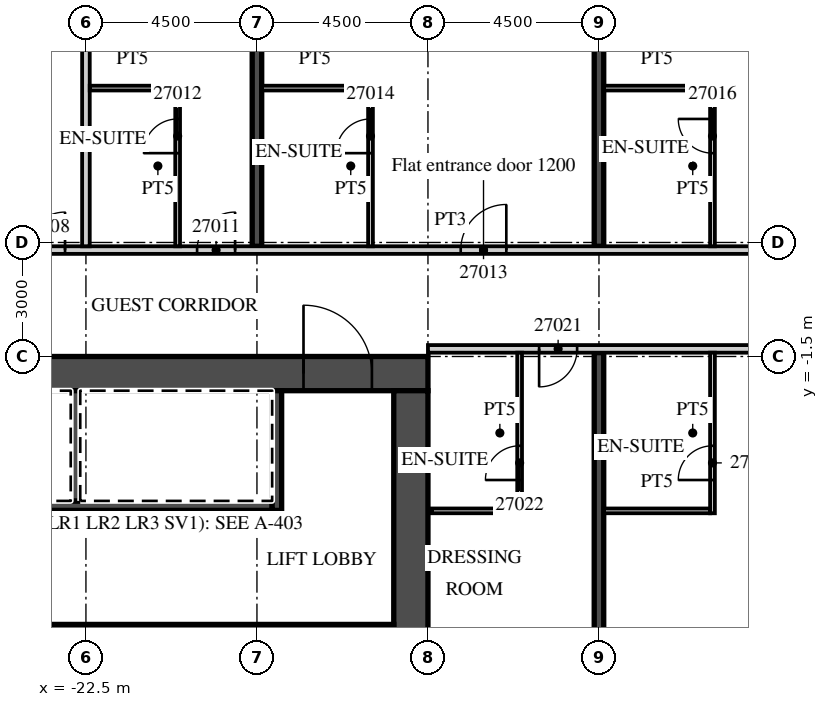
"""IFC4 building model, lengths in metres.
Left out: names, types, materials, properties, quantities, classifications, styles, units other than length and angle.
Written with IfcOpenShell. Run it as: python <this file> out.ifc"""

import sys

from ifc_helpers import new_model, si_unit, direction, frame, frame_2d, origin, place, context, subcontext, project, spatial, rectangle, extrude, element, fill, save


model = new_model("IFC4")
c1 = context("Model", 3, precision=1e-05, world=origin(), true_north=direction((0.0, 1.0)))
c2 = subcontext(c1, "Body", "Model", "MODEL_VIEW")
j1 = project(units=[si_unit("LENGTHUNIT", "METRE"), si_unit("PLANEANGLEUNIT", "RADIAN")], contexts=[c1])
p1 = place(None, origin())
s1 = spatial("IfcSite", under=j1, at=p1, CompositionType="ELEMENT")
p2 = place(p1, origin())
s2 = spatial("IfcBuilding", under=s1, at=p2, CompositionType="ELEMENT")
p3 = place(p2, frame((0.0, 0.0, 124.0)))
s3 = spatial("IfcBuildingStorey", under=s2, at=p3, CompositionType="ELEMENT", Elevation=124.0)
p4 = place(p3, frame((-18.0, 1.4, 0.0), z_axis=(0.0, 0.0, 1.0), x_axis=(0.0, 1.0, 0.0)))
e1 = element("IfcWall", 1, at=p4, inside=s3, PredefinedType="SHEAR", context=c2, shape_type="SweptSolid", body=[
    extrude(rectangle(XDim=18.207, YDim=0.25, at=frame_2d((9.104, 0.0))), origin(), (0.0, 0.0, 1.0), 3.3),
])
p5 = place(p3, frame((-9.0, -21.777, 0.0), z_axis=(0.0, 0.0, 1.0), x_axis=(0.0, 1.0, 0.0)))
e2 = element("IfcWall", 2, at=p5, inside=s3, PredefinedType="SHEAR", context=c2, shape_type="SweptSolid", body=[
    extrude(rectangle(XDim=20.377, YDim=0.25, at=frame_2d((10.188, 0.0))), origin(), (0.0, 0.0, 1.0), 3.3),
])
p6 = place(p3, frame((-9.0, 1.4, 0.0), z_axis=(0.0, 0.0, 1.0), x_axis=(0.0, 1.0, 0.0)))
e3 = element("IfcWall", 3, at=p6, inside=s3, PredefinedType="SHEAR", context=c2, shape_type="SweptSolid", body=[
    extrude(rectangle(XDim=19.073, YDim=0.25, at=frame_2d((9.537, 0.0))), origin(), (0.0, 0.0, 1.0), 3.3),
])
p7 = place(p3, frame((-39.316, 1.3, 0.0), z_axis=(0.0, 0.0, 1.0), x_axis=(1.0, 0.0, 0.0)))
e4 = element("IfcWall", 4, at=p7, inside=s3, PredefinedType="PARTITIONING", context=c2, shape_type="SweptSolid", body=[
    extrude(rectangle(XDim=52.816, YDim=0.2, at=frame_2d((26.408, 0.0))), origin(), (0.0, 0.0, 1.0), 3.02),
])
p8 = place(p7, frame((0.15, 0.0, 0.0)))
e5 = element("IfcOpeningElement", 5, at=p8, cuts=e4, PredefinedType="OPENING", context=c2, shape_type="SweptSolid", body=[
    extrude(rectangle(XDim=0.9, YDim=2.1, at=frame_2d((0.45, 1.05))), frame((0.0, 0.11, 0.0), z_axis=(0.0, -1.0, 0.0), x_axis=(1.0, 0.0, 0.0)), (0.0, 0.0, 1.0), 0.22),
])
p9 = place(p7, frame((3.891, 0.0, 0.0)))
e6 = element("IfcOpeningElement", 6, at=p9, cuts=e4, PredefinedType="OPENING", context=c2, shape_type="SweptSolid", body=[
    extrude(rectangle(XDim=1.0, YDim=2.1, at=frame_2d((0.5, 1.05))), frame((0.0, 0.11, 0.0), z_axis=(0.0, -1.0, 0.0), x_axis=(1.0, 0.0, 0.0)), (0.0, 0.0, 1.0), 0.22),
])
p10 = place(p7, frame((10.741, 0.0, 0.0)))
e7 = element("IfcOpeningElement", 7, at=p10, cuts=e4, PredefinedType="OPENING", context=c2, shape_type="SweptSolid", body=[
    extrude(rectangle(XDim=1.0, YDim=2.1, at=frame_2d((0.5, 1.05))), frame((0.0, 0.11, 0.0), z_axis=(0.0, -1.0, 0.0), x_axis=(1.0, 0.0, 0.0)), (0.0, 0.0, 1.0), 0.22),
])
p11 = place(p7, frame((15.266, 0.0, 0.0)))
e8 = element("IfcOpeningElement", 8, at=p11, cuts=e4, PredefinedType="OPENING", context=c2, shape_type="SweptSolid", body=[
    extrude(rectangle(XDim=1.0, YDim=2.1, at=frame_2d((0.5, 1.05))), frame((0.0, 0.11, 0.0), z_axis=(0.0, -1.0, 0.0), x_axis=(1.0, 0.0, 0.0)), (0.0, 0.0, 1.0), 0.22),
])
p12 = place(p7, frame((19.741, 0.0, 0.0)))
e9 = element("IfcOpeningElement", 9, at=p12, cuts=e4, PredefinedType="OPENING", context=c2, shape_type="SweptSolid", body=[
    extrude(rectangle(XDim=1.0, YDim=2.1, at=frame_2d((0.5, 1.05))), frame((0.0, 0.11, 0.0), z_axis=(0.0, -1.0, 0.0), x_axis=(1.0, 0.0, 0.0)), (0.0, 0.0, 1.0), 0.22),
])
p13 = place(p7, frame((26.678, 0.0, 0.0)))
e10 = element("IfcOpeningElement", 10, at=p13, cuts=e4, PredefinedType="OPENING", context=c2, shape_type="SweptSolid", body=[
    extrude(rectangle(XDim=1.2, YDim=2.1, at=frame_2d((0.6, 1.05))), frame((0.0, 0.11, 0.0), z_axis=(0.0, -1.0, 0.0), x_axis=(1.0, 0.0, 0.0)), (0.0, 0.0, 1.0), 0.22),
])
p14 = place(p7, frame((35.678, 0.0, 0.0)))
e11 = element("IfcOpeningElement", 11, at=p14, cuts=e4, PredefinedType="OPENING", context=c2, shape_type="SweptSolid", body=[
    extrude(rectangle(XDim=1.2, YDim=2.1, at=frame_2d((0.6, 1.05))), frame((0.0, 0.11, 0.0), z_axis=(0.0, -1.0, 0.0), x_axis=(1.0, 0.0, 0.0)), (0.0, 0.0, 1.0), 0.22),
])
p15 = place(p7, frame((41.754, 0.0, 0.0)))
e12 = element("IfcOpeningElement", 12, at=p15, cuts=e4, PredefinedType="OPENING", context=c2, shape_type="SweptSolid", body=[
    extrude(rectangle(XDim=1.2, YDim=2.1, at=frame_2d((0.6, 1.05))), frame((0.0, 0.11, 0.0), z_axis=(0.0, -1.0, 0.0), x_axis=(1.0, 0.0, 0.0)), (0.0, 0.0, 1.0), 0.22),
])
p16 = place(p7, frame((51.241, 0.0, 0.0)))
e13 = element("IfcOpeningElement", 13, at=p16, cuts=e4, PredefinedType="OPENING", context=c2, shape_type="SweptSolid", body=[
    extrude(rectangle(XDim=1.0, YDim=2.1, at=frame_2d((0.5, 1.05))), frame((0.0, 0.11, 0.0), z_axis=(0.0, -1.0, 0.0), x_axis=(1.0, 0.0, 0.0)), (0.0, 0.0, 1.0), 0.22),
])
p17 = place(p3, frame((-22.5, 1.4, 0.0), z_axis=(0.0, 0.0, 1.0), x_axis=(0.0, 1.0, 0.0)))
e14 = element("IfcWall", 14, at=p17, inside=s3, PredefinedType="PARTITIONING", context=c2, shape_type="SweptSolid", body=[
    extrude(rectangle(XDim=17.796, YDim=0.2, at=frame_2d((8.898, 0.0))), origin(), (0.0, 0.0, 1.0), 3.02),
])
p18 = place(p3, frame((-20.087, 1.4, 0.0), z_axis=(0.0, 0.0, 1.0), x_axis=(0.0, 1.0, 0.0)))
e15 = element("IfcWall", 15, at=p18, inside=s3, PredefinedType="PARTITIONING", context=c2, shape_type="SweptSolid", body=[
    extrude(rectangle(XDim=4.225, YDim=0.125, at=frame_2d((2.113, 0.0))), origin(), (0.0, 0.0, 1.0), 3.02),
])
p19 = place(p18, frame((2.45, 0.0, 0.0)))
e16 = element("IfcOpeningElement", 16, at=p19, cuts=e15, PredefinedType="OPENING", context=c2, shape_type="SweptSolid", body=[
    extrude(rectangle(XDim=0.9, YDim=2.1, at=frame_2d((0.45, 1.05))), frame((0.0, 0.073, 0.0), z_axis=(0.0, -1.0, 0.0), x_axis=(1.0, 0.0, 0.0)), (0.0, 0.0, 1.0), 0.145),
])
p20 = place(p3, frame((-22.4, 5.562, 0.0), z_axis=(0.0, 0.0, 1.0), x_axis=(1.0, 0.0, 0.0)))
e17 = element("IfcWall", 17, at=p20, inside=s3, PredefinedType="PARTITIONING", context=c2, shape_type="SweptSolid", body=[
    extrude(rectangle(XDim=2.25, YDim=0.125, at=frame_2d((1.125, 0.0))), origin(), (0.0, 0.0, 1.0), 3.02),
])
p21 = place(p3, frame((-15.012, 1.4, 0.0), z_axis=(0.0, 0.0, 1.0), x_axis=(0.0, 1.0, 0.0)))
e18 = element("IfcWall", 18, at=p21, inside=s3, PredefinedType="PARTITIONING", context=c2, shape_type="SweptSolid", body=[
    extrude(rectangle(XDim=4.225, YDim=0.125, at=frame_2d((2.113, 0.0))), origin(), (0.0, 0.0, 1.0), 3.02),
])
p22 = place(p21, frame((2.45, 0.0, 0.0)))
e19 = element("IfcOpeningElement", 19, at=p22, cuts=e18, PredefinedType="OPENING", context=c2, shape_type="SweptSolid", body=[
    extrude(rectangle(XDim=0.9, YDim=2.1, at=frame_2d((0.45, 1.05))), frame((0.0, 0.073, 0.0), z_axis=(0.0, -1.0, 0.0), x_axis=(1.0, 0.0, 0.0)), (0.0, 0.0, 1.0), 0.145),
])
p23 = place(p3, frame((-17.875, 5.562, 0.0), z_axis=(0.0, 0.0, 1.0), x_axis=(1.0, 0.0, 0.0)))
e20 = element("IfcWall", 20, at=p23, inside=s3, PredefinedType="PARTITIONING", context=c2, shape_type="SweptSolid", body=[
    extrude(rectangle(XDim=2.8, YDim=0.125, at=frame_2d((1.4, 0.0))), origin(), (0.0, 0.0, 1.0), 3.02),
])
p24 = place(p3, frame((-6.013, 1.4, 0.0), z_axis=(0.0, 0.0, 1.0), x_axis=(0.0, 1.0, 0.0)))
e21 = element("IfcWall", 21, at=p24, inside=s3, PredefinedType="PARTITIONING", context=c2, shape_type="SweptSolid", body=[
    extrude(rectangle(XDim=4.225, YDim=0.125, at=frame_2d((2.113, 0.0))), origin(), (0.0, 0.0, 1.0), 3.02),
])
p25 = place(p24, frame((2.45, 0.0, 0.0)))
e22 = element("IfcOpeningElement", 22, at=p25, cuts=e21, PredefinedType="OPENING", context=c2, shape_type="SweptSolid", body=[
    extrude(rectangle(XDim=0.9, YDim=2.1, at=frame_2d((0.45, 1.05))), frame((0.0, 0.073, 0.0), z_axis=(0.0, -1.0, 0.0), x_axis=(1.0, 0.0, 0.0)), (0.0, 0.0, 1.0), 0.145),
])
p26 = place(p3, frame((-8.875, 5.562, 0.0), z_axis=(0.0, 0.0, 1.0), x_axis=(1.0, 0.0, 0.0)))
e23 = element("IfcWall", 23, at=p26, inside=s3, PredefinedType="PARTITIONING", context=c2, shape_type="SweptSolid", body=[
    extrude(rectangle(XDim=2.8, YDim=0.125, at=frame_2d((1.4, 0.0))), origin(), (0.0, 0.0, 1.0), 3.02),
])
p27 = place(p3, frame((-13.5, -1.3, 0.0), z_axis=(0.0, 0.0, 1.0), x_axis=(1.0, 0.0, 0.0)))
e24 = element("IfcWall", 24, at=p27, inside=s3, PredefinedType="PARTITIONING", context=c2, shape_type="SweptSolid", body=[
    extrude(rectangle(XDim=60.932, YDim=0.2, at=frame_2d((30.466, 0.0))), origin(), (0.0, 0.0, 1.0), 3.02),
])
p28 = place(p27, frame((2.925, 0.0, 0.0)))
e25 = element("IfcOpeningElement", 25, at=p28, cuts=e24, PredefinedType="OPENING", context=c2, shape_type="SweptSolid", body=[
    extrude(rectangle(XDim=1.0, YDim=2.1, at=frame_2d((0.5, 1.05))), frame((0.0, 0.11, 0.0), z_axis=(0.0, -1.0, 0.0), x_axis=(1.0, 0.0, 0.0)), (0.0, 0.0, 1.0), 0.22),
])
p29 = place(p27, frame((9.863, 0.0, 0.0)))
e26 = element("IfcOpeningElement", 26, at=p29, cuts=e24, PredefinedType="OPENING", context=c2, shape_type="SweptSolid", body=[
    extrude(rectangle(XDim=1.2, YDim=2.1, at=frame_2d((0.6, 1.05))), frame((0.0, 0.11, 0.0), z_axis=(0.0, -1.0, 0.0), x_axis=(1.0, 0.0, 0.0)), (0.0, 0.0, 1.0), 0.22),
])
p30 = place(p27, frame((15.938, 0.0, 0.0)))
e27 = element("IfcOpeningElement", 27, at=p30, cuts=e24, PredefinedType="OPENING", context=c2, shape_type="SweptSolid", body=[
    extrude(rectangle(XDim=1.2, YDim=2.1, at=frame_2d((0.6, 1.05))), frame((0.0, 0.11, 0.0), z_axis=(0.0, -1.0, 0.0), x_axis=(1.0, 0.0, 0.0)), (0.0, 0.0, 1.0), 0.22),
])
p31 = place(p27, frame((27.862, 0.0, 0.0)))
e28 = element("IfcOpeningElement", 28, at=p31, cuts=e24, PredefinedType="OPENING", context=c2, shape_type="SweptSolid", body=[
    extrude(rectangle(XDim=1.2, YDim=2.1, at=frame_2d((0.6, 1.05))), frame((0.0, 0.11, 0.0), z_axis=(0.0, -1.0, 0.0), x_axis=(1.0, 0.0, 0.0)), (0.0, 0.0, 1.0), 0.22),
])
p32 = place(p27, frame((34.45, 0.0, 0.0)))
e29 = element("IfcOpeningElement", 29, at=p32, cuts=e24, PredefinedType="OPENING", context=c2, shape_type="SweptSolid", body=[
    extrude(rectangle(XDim=1.0, YDim=2.1, at=frame_2d((0.5, 1.05))), frame((0.0, 0.11, 0.0), z_axis=(0.0, -1.0, 0.0), x_axis=(1.0, 0.0, 0.0)), (0.0, 0.0, 1.0), 0.22),
])
p33 = place(p27, frame((36.55, 0.0, 0.0)))
e30 = element("IfcOpeningElement", 30, at=p33, cuts=e24, PredefinedType="OPENING", context=c2, shape_type="SweptSolid", body=[
    extrude(rectangle(XDim=1.0, YDim=2.1, at=frame_2d((0.5, 1.05))), frame((0.0, 0.11, 0.0), z_axis=(0.0, -1.0, 0.0), x_axis=(1.0, 0.0, 0.0)), (0.0, 0.0, 1.0), 0.22),
])
p34 = place(p27, frame((41.075, 0.0, 0.0)))
e31 = element("IfcOpeningElement", 31, at=p34, cuts=e24, PredefinedType="OPENING", context=c2, shape_type="SweptSolid", body=[
    extrude(rectangle(XDim=1.0, YDim=2.1, at=frame_2d((0.5, 1.05))), frame((0.0, 0.11, 0.0), z_axis=(0.0, -1.0, 0.0), x_axis=(1.0, 0.0, 0.0)), (0.0, 0.0, 1.0), 0.22),
])
p35 = place(p27, frame((45.55, 0.0, 0.0)))
e32 = element("IfcOpeningElement", 32, at=p35, cuts=e24, PredefinedType="OPENING", context=c2, shape_type="SweptSolid", body=[
    extrude(rectangle(XDim=1.0, YDim=2.1, at=frame_2d((0.5, 1.05))), frame((0.0, 0.11, 0.0), z_axis=(0.0, -1.0, 0.0), x_axis=(1.0, 0.0, 0.0)), (0.0, 0.0, 1.0), 0.22),
])
p36 = place(p27, frame((50.075, 0.0, 0.0)))
e33 = element("IfcOpeningElement", 33, at=p36, cuts=e24, PredefinedType="OPENING", context=c2, shape_type="SweptSolid", body=[
    extrude(rectangle(XDim=1.0, YDim=2.1, at=frame_2d((0.5, 1.05))), frame((0.0, 0.11, 0.0), z_axis=(0.0, -1.0, 0.0), x_axis=(1.0, 0.0, 0.0)), (0.0, 0.0, 1.0), 0.22),
])
p37 = place(p27, frame((54.575, 0.0, 0.0)))
e34 = element("IfcOpeningElement", 34, at=p37, cuts=e24, PredefinedType="OPENING", context=c2, shape_type="SweptSolid", body=[
    extrude(rectangle(XDim=1.0, YDim=2.1, at=frame_2d((0.5, 1.05))), frame((0.0, 0.11, 0.0), z_axis=(0.0, -1.0, 0.0), x_axis=(1.0, 0.0, 0.0)), (0.0, 0.0, 1.0), 0.22),
])
p38 = place(p27, frame((59.882, 0.0, 0.0)))
e35 = element("IfcOpeningElement", 35, at=p38, cuts=e24, PredefinedType="OPENING", context=c2, shape_type="SweptSolid", body=[
    extrude(rectangle(XDim=0.9, YDim=2.1, at=frame_2d((0.45, 1.05))), frame((0.0, 0.11, 0.0), z_axis=(0.0, -1.0, 0.0), x_axis=(1.0, 0.0, 0.0)), (0.0, 0.0, 1.0), 0.22),
])
p39 = place(p3, frame((-11.088, -5.625, 0.0), z_axis=(0.0, 0.0, 1.0), x_axis=(0.0, 1.0, 0.0)))
e36 = element("IfcWall", 36, at=p39, inside=s3, PredefinedType="PARTITIONING", context=c2, shape_type="SweptSolid", body=[
    extrude(rectangle(XDim=4.225, YDim=0.125, at=frame_2d((2.113, 0.0))), origin(), (0.0, 0.0, 1.0), 3.02),
])
p40 = place(p39, frame((0.875, 0.0, 0.0)))
e37 = element("IfcOpeningElement", 37, at=p40, cuts=e36, PredefinedType="OPENING", context=c2, shape_type="SweptSolid", body=[
    extrude(rectangle(XDim=0.9, YDim=2.1, at=frame_2d((0.45, 1.05))), frame((0.0, 0.073, 0.0), z_axis=(0.0, -1.0, 0.0), x_axis=(1.0, 0.0, 0.0)), (0.0, 0.0, 1.0), 0.145),
])
p41 = place(p3, frame((-13.4, -5.562, 0.0), z_axis=(0.0, 0.0, 1.0), x_axis=(1.0, 0.0, 0.0)))
e38 = element("IfcWall", 38, at=p41, inside=s3, PredefinedType="PARTITIONING", context=c2, shape_type="SweptSolid", body=[
    extrude(rectangle(XDim=2.25, YDim=0.125, at=frame_2d((1.125, 0.0))), origin(), (0.0, 0.0, 1.0), 3.02),
])
p42 = place(p3, frame((-6.013, -5.625, 0.0), z_axis=(0.0, 0.0, 1.0), x_axis=(0.0, 1.0, 0.0)))
e39 = element("IfcWall", 39, at=p42, inside=s3, PredefinedType="PARTITIONING", context=c2, shape_type="SweptSolid", body=[
    extrude(rectangle(XDim=4.225, YDim=0.125, at=frame_2d((2.113, 0.0))), origin(), (0.0, 0.0, 1.0), 3.02),
])
p43 = place(p42, frame((0.875, 0.0, 0.0)))
e40 = element("IfcOpeningElement", 40, at=p43, cuts=e39, PredefinedType="OPENING", context=c2, shape_type="SweptSolid", body=[
    extrude(rectangle(XDim=0.9, YDim=2.1, at=frame_2d((0.45, 1.05))), frame((0.0, 0.073, 0.0), z_axis=(0.0, -1.0, 0.0), x_axis=(1.0, 0.0, 0.0)), (0.0, 0.0, 1.0), 0.145),
])
p44 = place(p3, frame((-8.875, -5.562, 0.0), z_axis=(0.0, 0.0, 1.0), x_axis=(1.0, 0.0, 0.0)))
e41 = element("IfcWall", 41, at=p44, inside=s3, PredefinedType="PARTITIONING", context=c2, shape_type="SweptSolid", body=[
    extrude(rectangle(XDim=2.8, YDim=0.125, at=frame_2d((1.4, 0.0))), origin(), (0.0, 0.0, 1.0), 3.02),
])
p45 = place(p3, frame((-31.5, -1.95, 0.0), z_axis=(0.0, 0.0, 1.0), x_axis=(1.0, 0.0, 0.0)))
e42 = element("IfcWall", 42, at=p45, inside=s3, PredefinedType="SHEAR", context=c2, shape_type="SweptSolid", body=[
    extrude(rectangle(XDim=18.0, YDim=0.9, at=frame_2d((9.0, 0.0))), origin(), (0.0, 0.0, 1.0), 3.02),
])
p46 = place(p45, frame((14.725, 0.0, 0.0)))
e43 = element("IfcOpeningElement", 43, at=p46, cuts=e42, PredefinedType="OPENING", context=c2, shape_type="SweptSolid", body=[
    extrude(rectangle(XDim=1.8, YDim=2.1, at=frame_2d((0.9, 1.05))), frame((0.0, 0.46, 0.0), z_axis=(0.0, -1.0, 0.0), x_axis=(1.0, 0.0, 0.0)), (0.0, 0.0, 1.0), 0.92),
])
p47 = place(p3, frame((-13.95, -14.6, 0.0), z_axis=(0.0, 0.0, 1.0), x_axis=(0.0, 1.0, 0.0)))
e44 = element("IfcWall", 44, at=p47, inside=s3, PredefinedType="SHEAR", context=c2, shape_type="SweptSolid", body=[
    extrude(rectangle(XDim=12.2, YDim=0.9, at=frame_2d((6.1, 0.0))), origin(), (0.0, 0.0, 1.0), 3.02),
])
p48 = place(p3, frame((-30.6, -5.425, 0.0), z_axis=(0.0, 0.0, 1.0), x_axis=(1.0, 0.0, 0.0)))
e45 = element("IfcWall", 45, at=p48, inside=s3, PredefinedType="SHEAR", context=c2, shape_type="SweptSolid", body=[
    extrude(rectangle(XDim=13.0, YDim=0.25, at=frame_2d((6.5, 0.0))), origin(), (0.0, 0.0, 1.0), 3.02),
])
p49 = place(p3, frame((-17.475, -5.55, 0.0), z_axis=(0.0, 0.0, 1.0), x_axis=(0.0, 1.0, 0.0)))
e46 = element("IfcWall", 46, at=p49, inside=s3, PredefinedType="SHEAR", context=c2, shape_type="SweptSolid", body=[
    extrude(rectangle(XDim=3.15, YDim=0.25, at=frame_2d((1.575, 0.0))), origin(), (0.0, 0.0, 1.0), 3.02),
])
p50 = place(p3, frame((-22.775, -5.3, 0.0), z_axis=(0.0, 0.0, 1.0), x_axis=(0.0, 1.0, 0.0)))
e47 = element("IfcWall", 47, at=p50, inside=s3, PredefinedType="SHEAR", context=c2, shape_type="SweptSolid", body=[
    extrude(rectangle(XDim=2.9, YDim=0.25, at=frame_2d((1.45, 0.0))), origin(), (0.0, 0.0, 1.0), 3.02),
])
p51 = place(p3, frame((-30.6, -8.675, 0.0), z_axis=(0.0, 0.0, 1.0), x_axis=(1.0, 0.0, 0.0)))
e48 = element("IfcWall", 48, at=p51, inside=s3, PredefinedType="SHEAR", context=c2, shape_type="SweptSolid", body=[
    extrude(rectangle(XDim=16.2, YDim=0.25, at=frame_2d((8.1, 0.0))), origin(), (0.0, 0.0, 1.0), 3.02),
])
p52 = place(p51, frame((0.6, 0.0, 0.0)))
e49 = element("IfcOpeningElement", 49, at=p52, cuts=e48, PredefinedType="OPENING", context=c2, shape_type="SweptSolid", body=[
    extrude(rectangle(XDim=1.2, YDim=2.1, at=frame_2d((0.6, 1.05))), frame((0.0, 0.135, 0.0), z_axis=(0.0, -1.0, 0.0), x_axis=(1.0, 0.0, 0.0)), (0.0, 0.0, 1.0), 0.27),
])
p53 = place(p51, frame((3.25, 0.0, 0.0)))
e50 = element("IfcOpeningElement", 50, at=p53, cuts=e48, PredefinedType="OPENING", context=c2, shape_type="SweptSolid", body=[
    extrude(rectangle(XDim=1.2, YDim=2.1, at=frame_2d((0.6, 1.05))), frame((0.0, 0.135, 0.0), z_axis=(0.0, -1.0, 0.0), x_axis=(1.0, 0.0, 0.0)), (0.0, 0.0, 1.0), 0.27),
])
p54 = place(p51, frame((5.9, 0.0, 0.0)))
e51 = element("IfcOpeningElement", 51, at=p54, cuts=e48, PredefinedType="OPENING", context=c2, shape_type="SweptSolid", body=[
    extrude(rectangle(XDim=1.2, YDim=2.1, at=frame_2d((0.6, 1.05))), frame((0.0, 0.135, 0.0), z_axis=(0.0, -1.0, 0.0), x_axis=(1.0, 0.0, 0.0)), (0.0, 0.0, 1.0), 0.27),
])
p55 = place(p51, frame((14.25, 0.0, 0.0)))
e52 = element("IfcOpeningElement", 52, at=p55, cuts=e48, PredefinedType="OPENING", context=c2, shape_type="SweptSolid", body=[
    extrude(rectangle(XDim=1.3, YDim=2.1, at=frame_2d((0.65, 1.05))), frame((0.0, 0.135, 0.0), z_axis=(0.0, -1.0, 0.0), x_axis=(1.0, 0.0, 0.0)), (0.0, 0.0, 1.0), 0.27),
])
p56 = place(p11, origin())
e53 = element("IfcDoor", 53, at=p56, inside=s3, OperationType="SINGLE_SWING_RIGHT", PredefinedType="DOOR", context=c2, shape_type="SweptSolid", body=[
    extrude(rectangle(XDim=1.0, YDim=2.1, at=frame_2d((0.5, 1.05))), frame((0.0, 0.025, 0.0), z_axis=(0.0, -1.0, 0.0), x_axis=(1.0, 0.0, 0.0)), (0.0, 0.0, 1.0), 0.05),
])
fill(e8, e53)
p57 = place(p12, origin())
e54 = element("IfcDoor", 54, at=p57, inside=s3, OperationType="SINGLE_SWING_RIGHT", PredefinedType="DOOR", context=c2, shape_type="SweptSolid", body=[
    extrude(rectangle(XDim=1.0, YDim=2.1, at=frame_2d((0.5, 1.05))), frame((0.0, 0.025, 0.0), z_axis=(0.0, -1.0, 0.0), x_axis=(1.0, 0.0, 0.0)), (0.0, 0.0, 1.0), 0.05),
])
fill(e9, e54)
p58 = place(p19, origin())
e55 = element("IfcDoor", 55, at=p58, inside=s3, OperationType="SINGLE_SWING_LEFT", PredefinedType="DOOR", context=c2, shape_type="SweptSolid", body=[
    extrude(rectangle(XDim=0.9, YDim=2.1, at=frame_2d((0.45, 1.05))), frame((0.0, 0.025, 0.0), z_axis=(0.0, -1.0, 0.0), x_axis=(1.0, 0.0, 0.0)), (0.0, 0.0, 1.0), 0.05),
])
fill(e16, e55)
p59 = place(p13, origin())
e56 = element("IfcDoor", 56, at=p59, inside=s3, OperationType="SINGLE_SWING_RIGHT", PredefinedType="DOOR", context=c2, shape_type="SweptSolid", body=[
    extrude(rectangle(XDim=1.2, YDim=2.1, at=frame_2d((0.6, 1.05))), frame((0.0, 0.025, 0.0), z_axis=(0.0, -1.0, 0.0), x_axis=(1.0, 0.0, 0.0)), (0.0, 0.0, 1.0), 0.05),
])
fill(e10, e56)
p60 = place(p22, origin())
e57 = element("IfcDoor", 57, at=p60, inside=s3, OperationType="SINGLE_SWING_LEFT", PredefinedType="DOOR", context=c2, shape_type="SweptSolid", body=[
    extrude(rectangle(XDim=0.9, YDim=2.1, at=frame_2d((0.45, 1.05))), frame((0.0, 0.025, 0.0), z_axis=(0.0, -1.0, 0.0), x_axis=(1.0, 0.0, 0.0)), (0.0, 0.0, 1.0), 0.05),
])
fill(e19, e57)
p61 = place(p25, origin())
e58 = element("IfcDoor", 58, at=p61, inside=s3, OperationType="SINGLE_SWING_RIGHT", PredefinedType="DOOR", context=c2, shape_type="SweptSolid", body=[
    extrude(rectangle(XDim=0.9, YDim=2.1, at=frame_2d((0.45, 1.05))), frame((0.0, 0.025, 0.0), z_axis=(0.0, -1.0, 0.0), x_axis=(1.0, 0.0, 0.0)), (0.0, 0.0, 1.0), 0.05),
])
fill(e22, e58)
p62 = place(p28, origin())
e59 = element("IfcDoor", 59, at=p62, inside=s3, OperationType="SINGLE_SWING_LEFT", PredefinedType="DOOR", context=c2, shape_type="SweptSolid", body=[
    extrude(rectangle(XDim=1.0, YDim=2.1, at=frame_2d((0.5, 1.05))), frame((0.0, 0.025, 0.0), z_axis=(0.0, -1.0, 0.0), x_axis=(1.0, 0.0, 0.0)), (0.0, 0.0, 1.0), 0.05),
])
fill(e25, e59)
p63 = place(p40, origin())
e60 = element("IfcDoor", 60, at=p63, inside=s3, OperationType="SINGLE_SWING_LEFT", PredefinedType="DOOR", context=c2, shape_type="SweptSolid", body=[
    extrude(rectangle(XDim=0.9, YDim=2.1, at=frame_2d((0.45, 1.05))), frame((0.0, 0.025, 0.0), z_axis=(0.0, -1.0, 0.0), x_axis=(1.0, 0.0, 0.0)), (0.0, 0.0, 1.0), 0.05),
])
fill(e37, e60)
p64 = place(p43, origin())
e61 = element("IfcDoor", 61, at=p64, inside=s3, OperationType="SINGLE_SWING_LEFT", PredefinedType="DOOR", context=c2, shape_type="SweptSolid", body=[
    extrude(rectangle(XDim=0.9, YDim=2.1, at=frame_2d((0.45, 1.05))), frame((0.0, 0.025, 0.0), z_axis=(0.0, -1.0, 0.0), x_axis=(1.0, 0.0, 0.0)), (0.0, 0.0, 1.0), 0.05),
])
fill(e40, e61)
p65 = place(p46, origin())
e62 = element("IfcDoor", 62, at=p65, inside=s3, OperationType="DOUBLE_DOOR_DOUBLE_SWING", PredefinedType="DOOR", context=c2, shape_type="SweptSolid", body=[
    extrude(rectangle(XDim=1.8, YDim=2.1, at=frame_2d((0.9, 1.05))), frame((0.0, 0.025, 0.0), z_axis=(0.0, -1.0, 0.0), x_axis=(1.0, 0.0, 0.0)), (0.0, 0.0, 1.0), 0.05),
])
fill(e43, e62)
save(model, sys.argv[1])
